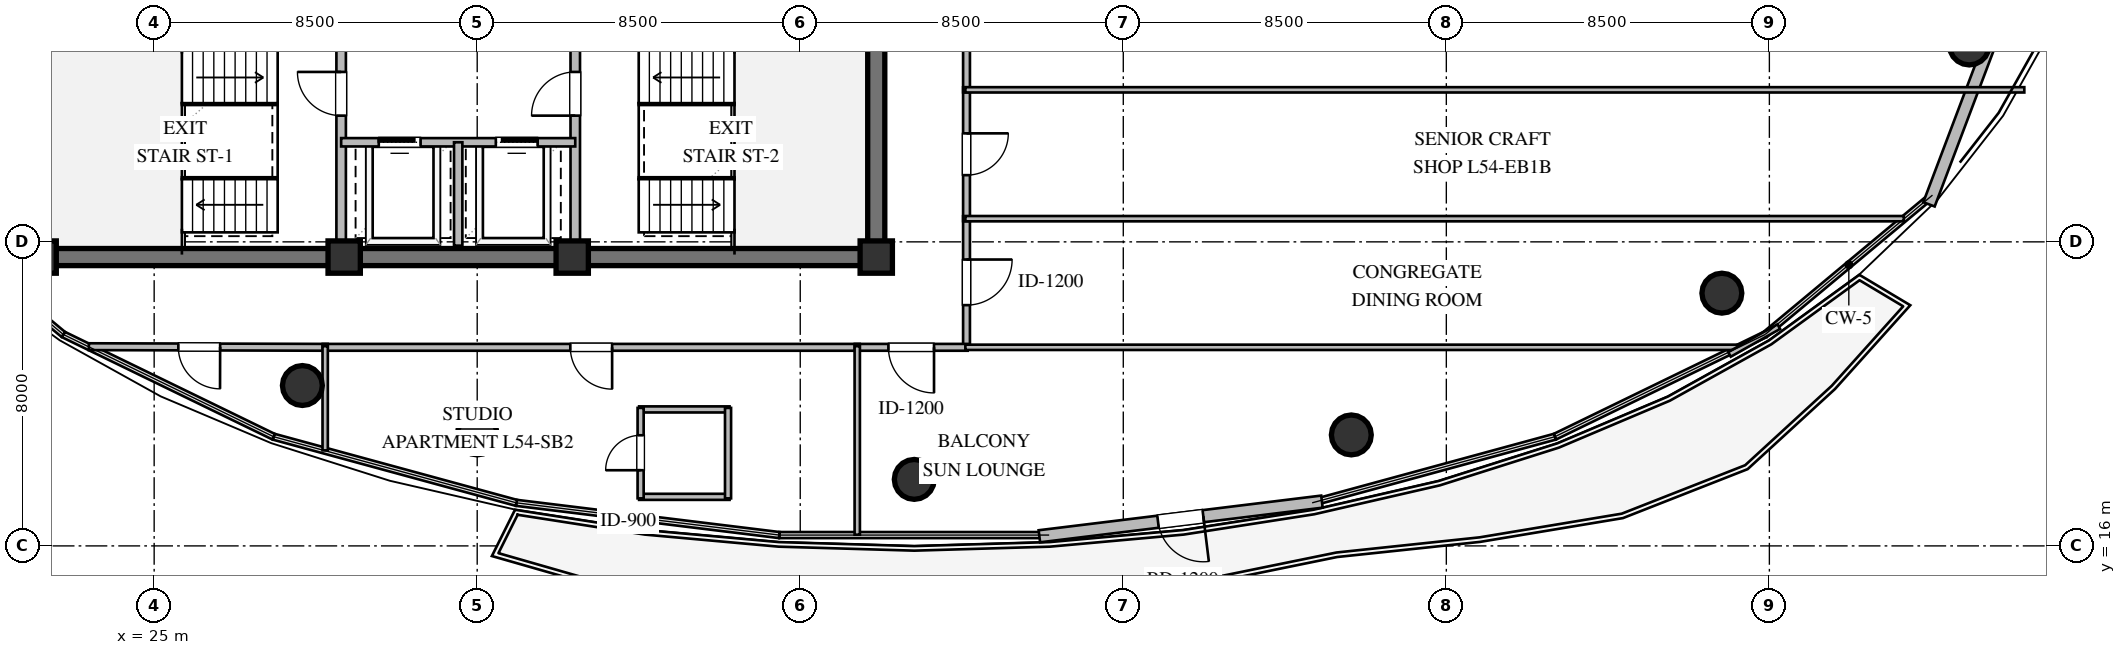
"""IFC4 building model, lengths in metres.
Left out: names, types, materials, properties, quantities, classifications, styles, units other than length and angle.
Written with IfcOpenShell. Run it as: python <this file> out.ifc"""

import sys

from ifc_helpers import new_model, si_unit, direction, frame, frame_2d, origin, origin_2d, place, context, subcontext, project, spatial, rectangle, circle, extrude, element, fill, save


model = new_model("IFC4")
c1 = context("Model", 3, precision=1e-05, world=origin(), true_north=direction((0.0, 1.0)))
c2 = subcontext(c1, "Body", "Model", "MODEL_VIEW")
j1 = project(units=[si_unit("LENGTHUNIT", "METRE"), si_unit("PLANEANGLEUNIT", "RADIAN")], contexts=[c1])
p1 = place(None, origin())
s1 = spatial("IfcSite", under=j1, at=p1, CompositionType="ELEMENT")
p2 = place(p1, origin())
s2 = spatial("IfcBuilding", under=s1, at=p2, CompositionType="ELEMENT")
p3 = place(p2, frame((0.0, 0.0, 206.4)))
s3 = spatial("IfcBuildingStorey", under=s2, at=p3, CompositionType="ELEMENT", Elevation=206.4)
p4 = place(p3, frame((21.775, 23.6, 0.0), z_axis=(0.0, 0.0, 1.0), x_axis=(1.0, 0.0, 0.0)))
e1 = element("IfcWall", 1, at=p4, inside=s3, PredefinedType="SHEAR", context=c2, shape_type="SweptSolid", body=[
    extrude(rectangle(XDim=22.45, YDim=0.45, at=frame_2d((11.225, 0.0))), origin(), (0.0, 0.0, 1.0), 3.36),
])
p5 = place(p3, frame((44.0, 23.825, 0.0), z_axis=(0.0, 0.0, 1.0), x_axis=(0.0, 1.0, 0.0)))
e2 = element("IfcWall", 2, at=p5, inside=s3, PredefinedType="SHEAR", context=c2, shape_type="SweptSolid", body=[
    extrude(rectangle(XDim=12.35, YDim=0.45, at=frame_2d((6.175, 0.0))), origin(), (0.0, 0.0, 1.0), 3.36),
])
p6 = place(p5, frame((8.675, 0.0, 0.0)))
e3 = element("IfcOpeningElement", 3, at=p6, cuts=e2, PredefinedType="OPENING", context=c2, shape_type="SweptSolid", body=[
    extrude(rectangle(XDim=1.5, YDim=2.15, at=frame_2d((0.75, 1.075))), frame((0.0, 0.235, 0.0), z_axis=(0.0, -1.0, 0.0), x_axis=(1.0, 0.0, 0.0)), (0.0, 0.0, 1.0), 0.47),
])
for number, where, z_axis, x_axis in (
    (4, (22.0, 23.6, 0.0), (0.0, 0.0, 1.0), (1.0, 0.0, 0.0)),
    (5, (30.0, 23.6, 0.0), (0.0, 0.0, 1.0), (1.0, 0.0, 0.0)),
    (6, (36.0, 23.6, 0.0), (0.0, 0.0, 1.0), (1.0, 0.0, 0.0)),
    (7, (44.0, 23.6, 0.0), (0.0, 0.0, 1.0), (1.0, 0.0, 0.0)),
):
    element("IfcColumn", number, at=place(p3, frame(where, z_axis=z_axis, x_axis=x_axis)), inside=s3, PredefinedType="COLUMN", context=c2, shape_type="SweptSolid", body=[
        extrude(rectangle(XDim=0.85, YDim=0.85, at=origin_2d()), origin(), (0.0, 0.0, 1.0), 3.6),
    ])
for number, where, z_axis, x_axis in (
    (8, (28.9, 20.22, 0.0), (0.0, 0.0, 1.0), (1.0, 0.0, 0.0)),
    (9, (33.5, 18.92, 0.0), (0.0, 0.0, 1.0), (1.0, 0.0, 0.0)),
    (10, (45.0, 17.75, 0.0), (0.0, 0.0, 1.0), (1.0, 0.0, 0.0)),
    (11, (56.5, 18.92, 0.0), (0.0, 0.0, 1.0), (1.0, 0.0, 0.0)),
    (12, (66.25, 22.65, 0.0), (0.0, 0.0, 1.0), (1.0, 0.0, 0.0)),
    (13, (72.76, 29.18, 0.0), (0.0, 0.0, 1.0), (1.0, 0.0, 0.0)),
):
    element("IfcColumn", number, at=place(p3, frame(where, z_axis=z_axis, x_axis=x_axis)), inside=s3, PredefinedType="COLUMN", context=c2, shape_type="SweptSolid", body=[
        extrude(circle(Radius=0.525, at=origin_2d()), origin(), (0.0, 0.0, 1.0), 3.6),
    ])
p7 = place(p3, frame((76.712, 38.243, 0.0), z_axis=(0.0, 0.0, 1.0), x_axis=(-0.353659523244, -0.935374225441, 0.0)))
e14 = element("IfcWall", 14, at=p7, inside=s3, PredefinedType="STANDARD", context=c2, shape_type="SweptSolid", body=[
    extrude(rectangle(XDim=14.172, YDim=0.32, at=frame_2d((7.086, 0.0))), origin(), (0.0, 0.0, 1.0), 3.36),
])
p8 = place(p3, frame((55.727, 17.165, 0.0), z_axis=(0.0, 0.0, 1.0), x_axis=(-0.992559081031, -0.121763995755, 0.0)))
e15 = element("IfcWall", 15, at=p8, inside=s3, PredefinedType="STANDARD", context=c2, shape_type="SweptSolid", body=[
    extrude(rectangle(XDim=7.491, YDim=0.32, at=frame_2d((3.745, 0.0))), origin(), (0.0, 0.0, 1.0), 3.36),
])
p9 = place(p8, frame((3.145, 0.0, 0.0)))
e16 = element("IfcOpeningElement", 16, at=p9, cuts=e15, PredefinedType="OPENING", context=c2, shape_type="SweptSolid", body=[
    extrude(rectangle(XDim=1.2, YDim=2.15, at=frame_2d((0.6, 1.075))), frame((0.0, 0.17, 0.0), z_axis=(0.0, -1.0, 0.0), x_axis=(1.0, 0.0, 0.0)), (0.0, 0.0, 1.0), 0.34),
])
p10 = place(p3, frame((29.92, 23.9, 0.0), z_axis=(0.0, 0.0, 1.0), x_axis=(0.0, 1.0, 0.0)))
e17 = element("IfcWall", 17, at=p10, inside=s3, PredefinedType="SOLIDWALL", context=c2, shape_type="SweptSolid", body=[
    extrude(rectangle(XDim=5.4, YDim=0.25, at=frame_2d((2.7, 0.0))), origin(), (0.0, 0.0, 1.0), 3.36),
])
p11 = place(p10, frame((3.421, 0.0, 0.0)))
e18 = element("IfcOpeningElement", 18, at=p11, cuts=e17, PredefinedType="OPENING", context=c2, shape_type="SweptSolid", body=[
    extrude(rectangle(XDim=1.15, YDim=2.1, at=frame_2d((0.575, 1.05))), frame((0.0, 0.135, 0.0), z_axis=(0.0, -1.0, 0.0), x_axis=(1.0, 0.0, 0.0)), (0.0, 0.0, 1.0), 0.27),
])
p12 = place(p3, frame((36.08, 23.9, 0.0), z_axis=(0.0, 0.0, 1.0), x_axis=(0.0, 1.0, 0.0)))
e19 = element("IfcWall", 19, at=p12, inside=s3, PredefinedType="SOLIDWALL", context=c2, shape_type="SweptSolid", body=[
    extrude(rectangle(XDim=5.4, YDim=0.25, at=frame_2d((2.7, 0.0))), origin(), (0.0, 0.0, 1.0), 3.36),
])
p13 = place(p12, frame((3.421, 0.0, 0.0)))
e20 = element("IfcOpeningElement", 20, at=p13, cuts=e19, PredefinedType="OPENING", context=c2, shape_type="SweptSolid", body=[
    extrude(rectangle(XDim=1.15, YDim=2.1, at=frame_2d((0.575, 1.05))), frame((0.0, 0.135, 0.0), z_axis=(0.0, -1.0, 0.0), x_axis=(1.0, 0.0, 0.0)), (0.0, 0.0, 1.0), 0.27),
])
p14 = place(p3, frame((29.92, 26.62, 0.0), z_axis=(0.0, 0.0, 1.0), x_axis=(1.0, 0.0, 0.0)))
e21 = element("IfcWall", 21, at=p14, inside=s3, PredefinedType="SOLIDWALL", context=c2, shape_type="SweptSolid", body=[
    extrude(rectangle(XDim=6.16, YDim=0.22, at=frame_2d((3.08, 0.0))), origin(), (0.0, 0.0, 1.0), 3.36),
])
p15 = place(p14, frame((0.99, 0.0, 0.0)))
e22 = element("IfcOpeningElement", 22, at=p15, cuts=e21, PredefinedType="OPENING", context=c2, shape_type="SweptSolid", body=[
    extrude(rectangle(XDim=1.1, YDim=2.1, at=frame_2d((0.55, 1.05))), frame((0.0, 0.12, 0.0), z_axis=(0.0, -1.0, 0.0), x_axis=(1.0, 0.0, 0.0)), (0.0, 0.0, 1.0), 0.24),
])
p16 = place(p14, frame((4.07, 0.0, 0.0)))
e23 = element("IfcOpeningElement", 23, at=p16, cuts=e21, PredefinedType="OPENING", context=c2, shape_type="SweptSolid", body=[
    extrude(rectangle(XDim=1.1, YDim=2.1, at=frame_2d((0.55, 1.05))), frame((0.0, 0.12, 0.0), z_axis=(0.0, -1.0, 0.0), x_axis=(1.0, 0.0, 0.0)), (0.0, 0.0, 1.0), 0.24),
])
p17 = place(p3, frame((33.0, 23.9, 0.0), z_axis=(0.0, 0.0, 1.0), x_axis=(0.0, 1.0, 0.0)))
e24 = element("IfcWall", 24, at=p17, inside=s3, PredefinedType="SOLIDWALL", context=c2, shape_type="SweptSolid", body=[
    extrude(rectangle(XDim=2.72, YDim=0.22, at=frame_2d((1.36, 0.0))), origin(), (0.0, 0.0, 1.0), 3.36),
])
for number, where, z_axis, x_axis in (
    (25, (37.76, 17.291, 0.0), (0.0, 0.0, 1.0), (1.0, 0.0, 0.0)),
    (26, (37.76, 19.591, 0.0), (0.0, 0.0, 1.0), (1.0, 0.0, 0.0)),
):
    element("IfcWall", number, at=place(p3, frame(where, z_axis=z_axis, x_axis=x_axis)), inside=s3, PredefinedType="PLUMBINGWALL", context=c2, shape_type="SweptSolid", body=[
        extrude(rectangle(XDim=2.38, YDim=0.16, at=frame_2d((1.19, 0.0))), origin(), (0.0, 0.0, 1.0), 3.36),
    ])
p18 = place(p3, frame((37.8, 17.251, 0.0), z_axis=(0.0, 0.0, 1.0), x_axis=(0.0, 1.0, 0.0)))
e27 = element("IfcWall", 27, at=p18, inside=s3, PredefinedType="PLUMBINGWALL", context=c2, shape_type="SweptSolid", body=[
    extrude(rectangle(XDim=2.38, YDim=0.16, at=frame_2d((1.19, 0.0))), origin(), (0.0, 0.0, 1.0), 3.36),
])
p19 = place(p18, frame((0.74, 0.0, 0.0)))
e28 = element("IfcOpeningElement", 28, at=p19, cuts=e27, PredefinedType="OPENING", context=c2, shape_type="SweptSolid", body=[
    extrude(rectangle(XDim=0.92, YDim=2.1, at=frame_2d((0.46, 1.05))), frame((0.0, 0.09, 0.0), z_axis=(0.0, -1.0, 0.0), x_axis=(1.0, 0.0, 0.0)), (0.0, 0.0, 1.0), 0.18),
])
p20 = place(p3, frame((40.1, 17.251, 0.0), z_axis=(0.0, 0.0, 1.0), x_axis=(0.0, 1.0, 0.0)))
e29 = element("IfcWall", 29, at=p20, inside=s3, PredefinedType="PLUMBINGWALL", context=c2, shape_type="SweptSolid", body=[
    extrude(rectangle(XDim=2.38, YDim=0.16, at=frame_2d((1.19, 0.0))), origin(), (0.0, 0.0, 1.0), 3.36),
])
p21 = place(p3, frame((46.375, 24.675, 0.0), z_axis=(0.0, 0.0, 1.0), x_axis=(0.0, -1.0, 0.0)))
e30 = element("IfcWall", 30, at=p21, inside=s3, PredefinedType="PARTITIONING", context=c2, shape_type="SweptSolid", body=[
    extrude(rectangle(XDim=3.48, YDim=0.18, at=frame_2d((1.74, 0.0))), origin(), (0.0, 0.0, 1.0), 3.36),
])
p22 = place(p21, frame((1.14, 0.0, 0.0)))
e31 = element("IfcOpeningElement", 31, at=p22, cuts=e30, PredefinedType="OPENING", context=c2, shape_type="SweptSolid", body=[
    extrude(rectangle(XDim=1.2, YDim=2.15, at=frame_2d((0.6, 1.075))), frame((0.0, 0.1, 0.0), z_axis=(0.0, -1.0, 0.0), x_axis=(1.0, 0.0, 0.0)), (0.0, 0.0, 1.0), 0.2),
])
p23 = place(p3, frame((46.375, 28.065, 0.0), z_axis=(0.0, 0.0, 1.0), x_axis=(0.0, -1.0, 0.0)))
e32 = element("IfcWall", 32, at=p23, inside=s3, PredefinedType="PARTITIONING", context=c2, shape_type="SweptSolid", body=[
    extrude(rectangle(XDim=3.52, YDim=0.18, at=frame_2d((1.76, 0.0))), origin(), (0.0, 0.0, 1.0), 3.36),
])
p24 = place(p23, frame((1.21, 0.0, 0.0)))
e33 = element("IfcOpeningElement", 33, at=p24, cuts=e32, PredefinedType="OPENING", context=c2, shape_type="SweptSolid", body=[
    extrude(rectangle(XDim=1.1, YDim=2.1, at=frame_2d((0.55, 1.05))), frame((0.0, 0.1, 0.0), z_axis=(0.0, -1.0, 0.0), x_axis=(1.0, 0.0, 0.0)), (0.0, 0.0, 1.0), 0.2),
])
p25 = place(p3, frame((46.375, 31.565, 0.0), z_axis=(0.0, 0.0, 1.0), x_axis=(0.0, -1.0, 0.0)))
e34 = element("IfcWall", 34, at=p25, inside=s3, PredefinedType="PARTITIONING", context=c2, shape_type="SweptSolid", body=[
    extrude(rectangle(XDim=3.63, YDim=0.18, at=frame_2d((1.815, 0.0))), origin(), (0.0, 0.0, 1.0), 3.36),
])
p26 = place(p25, frame((1.265, 0.0, 0.0)))
e35 = element("IfcOpeningElement", 35, at=p26, cuts=e34, PredefinedType="OPENING", context=c2, shape_type="SweptSolid", body=[
    extrude(rectangle(XDim=1.1, YDim=2.1, at=frame_2d((0.55, 1.05))), frame((0.0, 0.1, 0.0), z_axis=(0.0, -1.0, 0.0), x_axis=(1.0, 0.0, 0.0)), (0.0, 0.0, 1.0), 0.2),
])
p27 = place(p3, frame((29.565, 21.225, 0.0), z_axis=(0.0, 0.0, 1.0), x_axis=(-0.999996509373, 0.002642204019, 0.0)))
e36 = element("IfcWall", 36, at=p27, inside=s3, PredefinedType="PARTITIONING", context=c2, shape_type="SweptSolid", body=[
    extrude(rectangle(XDim=6.283, YDim=0.18, at=frame_2d((3.142, 0.0))), origin(), (0.0, 0.0, 1.0), 2.806),
])
p28 = place(p27, frame((2.829, 0.0, 0.0)))
e37 = element("IfcOpeningElement", 37, at=p28, cuts=e36, PredefinedType="OPENING", context=c2, shape_type="SweptSolid", body=[
    extrude(rectangle(XDim=1.1, YDim=2.1, at=frame_2d((0.55, 1.05))), frame((0.0, 0.1, 0.0), z_axis=(0.0, -1.0, 0.0), x_axis=(1.0, 0.0, 0.0)), (0.0, 0.0, 1.0), 0.2),
])
p29 = place(p3, frame((43.565, 21.225, 0.0), z_axis=(0.0, 0.0, 1.0), x_axis=(-1.0, 0.0, 0.0)))
e38 = element("IfcWall", 38, at=p29, inside=s3, PredefinedType="PARTITIONING", context=c2, shape_type="SweptSolid", body=[
    extrude(rectangle(XDim=14.13, YDim=0.18, at=frame_2d((7.065, 0.0))), origin(), (0.0, 0.0, 1.0), 2.996),
])
p30 = place(p29, frame((6.515, 0.0, 0.0)))
e39 = element("IfcOpeningElement", 39, at=p30, cuts=e38, PredefinedType="OPENING", context=c2, shape_type="SweptSolid", body=[
    extrude(rectangle(XDim=1.1, YDim=2.1, at=frame_2d((0.55, 1.05))), frame((0.0, 0.1, 0.0), z_axis=(0.0, -1.0, 0.0), x_axis=(1.0, 0.0, 0.0)), (0.0, 0.0, 1.0), 0.2),
])
p31 = place(p3, frame((46.405, 21.225, 0.0), z_axis=(0.0, 0.0, 1.0), x_axis=(-1.0, 0.0, 0.0)))
e40 = element("IfcWall", 40, at=p31, inside=s3, PredefinedType="PARTITIONING", context=c2, shape_type="SweptSolid", body=[
    extrude(rectangle(XDim=2.97, YDim=0.18, at=frame_2d((1.485, 0.0))), origin(), (0.0, 0.0, 1.0), 3.36),
])
p32 = place(p31, frame((0.885, 0.0, 0.0)))
e41 = element("IfcOpeningElement", 41, at=p32, cuts=e40, PredefinedType="OPENING", context=c2, shape_type="SweptSolid", body=[
    extrude(rectangle(XDim=1.2, YDim=2.15, at=frame_2d((0.6, 1.075))), frame((0.0, 0.1, 0.0), z_axis=(0.0, -1.0, 0.0), x_axis=(1.0, 0.0, 0.0)), (0.0, 0.0, 1.0), 0.2),
])
p33 = place(p3, frame((46.345, 24.61, 0.0), z_axis=(0.0, 0.0, 1.0), x_axis=(1.0, 0.0, 0.0)))
e42 = element("IfcWall", 42, at=p33, inside=s3, PredefinedType="PARTITIONING", context=c2, shape_type="SweptSolid", body=[
    extrude(rectangle(XDim=24.693, YDim=0.14, at=frame_2d((12.346, 0.0))), origin(), (0.0, 0.0, 1.0), 2.806),
])
p34 = place(p3, frame((66.684, 21.225, 0.0), z_axis=(0.0, 0.0, 1.0), x_axis=(-1.0, 0.0, 0.0)))
e43 = element("IfcWall", 43, at=p34, inside=s3, PredefinedType="PARTITIONING", context=c2, shape_type="SweptSolid", body=[
    extrude(rectangle(XDim=20.339, YDim=0.14, at=frame_2d((10.169, 0.0))), origin(), (0.0, 0.0, 1.0), 2.996),
])
p35 = place(p3, frame((67.748, 21.77, 0.0), z_axis=(0.0, 0.0, 1.0), x_axis=(-0.871352238731, -0.490658003153, 0.0)))
e44 = element("IfcWall", 44, at=p35, inside=s3, PredefinedType="PARTITIONING", context=c2, shape_type="SweptSolid", body=[
    extrude(rectangle(XDim=1.49, YDim=0.14, at=frame_2d((0.745, 0.0))), origin(), (0.0, 0.0, 1.0), 3.36),
])
p36 = place(p3, frame((46.345, 28.0, 0.0), z_axis=(0.0, 0.0, 1.0), x_axis=(1.0, 0.0, 0.0)))
e45 = element("IfcWall", 45, at=p36, inside=s3, PredefinedType="PARTITIONING", context=c2, shape_type="SweptSolid", body=[
    extrude(rectangle(XDim=27.863, YDim=0.14, at=frame_2d((13.932, 0.0))), origin(), (0.0, 0.0, 1.0), 2.806),
])
p37 = place(p3, frame((29.5, 21.255, 0.0), z_axis=(0.0, 0.0, 1.0), x_axis=(0.0, -1.0, 0.0)))
e46 = element("IfcWall", 46, at=p37, inside=s3, PredefinedType="PARTITIONING", context=c2, shape_type="SweptSolid", body=[
    extrude(rectangle(XDim=2.741, YDim=0.14, at=frame_2d((1.371, 0.0))), origin(), (0.0, 0.0, 1.0), 3.36),
])
p38 = place(p3, frame((43.5, 21.255, 0.0), z_axis=(0.0, 0.0, 1.0), x_axis=(0.0, -1.0, 0.0)))
e47 = element("IfcWall", 47, at=p38, inside=s3, PredefinedType="PARTITIONING", context=c2, shape_type="SweptSolid", body=[
    extrude(rectangle(XDim=4.96, YDim=0.14, at=frame_2d((2.48, 0.0))), origin(), (0.0, 0.0, 1.0), 3.36),
])
p39 = place(p9, origin())
e48 = element("IfcDoor", 48, at=p39, inside=s3, OperationType="SINGLE_SWING_LEFT", PredefinedType="DOOR", context=c2, shape_type="SweptSolid", body=[
    extrude(rectangle(XDim=1.2, YDim=2.15, at=frame_2d((0.6, 1.075))), frame((0.0, 0.025, 0.0), z_axis=(0.0, -1.0, 0.0), x_axis=(1.0, 0.0, 0.0)), (0.0, 0.0, 1.0), 0.05),
])
fill(e16, e48)
p40 = place(p11, origin())
e49 = element("IfcDoor", 49, at=p40, inside=s3, OperationType="SINGLE_SWING_RIGHT", PredefinedType="DOOR", context=c2, shape_type="SweptSolid", body=[
    extrude(rectangle(XDim=1.15, YDim=2.1, at=frame_2d((0.575, 1.05))), frame((0.0, 0.025, 0.0), z_axis=(0.0, -1.0, 0.0), x_axis=(1.0, 0.0, 0.0)), (0.0, 0.0, 1.0), 0.05),
])
fill(e18, e49)
p41 = place(p13, origin())
e50 = element("IfcDoor", 50, at=p41, inside=s3, OperationType="SINGLE_SWING_LEFT", PredefinedType="DOOR", context=c2, shape_type="SweptSolid", body=[
    extrude(rectangle(XDim=1.15, YDim=2.1, at=frame_2d((0.575, 1.05))), frame((0.0, 0.025, 0.0), z_axis=(0.0, -1.0, 0.0), x_axis=(1.0, 0.0, 0.0)), (0.0, 0.0, 1.0), 0.05),
])
fill(e20, e50)
p42 = place(p15, origin())
e51 = element("IfcDoor", 51, at=p42, inside=s3, OperationType="SLIDING_TO_LEFT", PredefinedType="DOOR", context=c2, shape_type="SweptSolid", body=[
    extrude(rectangle(XDim=1.1, YDim=2.1, at=frame_2d((0.55, 1.05))), frame((0.0, 0.025, 0.0), z_axis=(0.0, -1.0, 0.0), x_axis=(1.0, 0.0, 0.0)), (0.0, 0.0, 1.0), 0.05),
])
fill(e22, e51)
p43 = place(p16, origin())
e52 = element("IfcDoor", 52, at=p43, inside=s3, OperationType="SLIDING_TO_RIGHT", PredefinedType="DOOR", context=c2, shape_type="SweptSolid", body=[
    extrude(rectangle(XDim=1.1, YDim=2.1, at=frame_2d((0.55, 1.05))), frame((0.0, 0.025, 0.0), z_axis=(0.0, -1.0, 0.0), x_axis=(1.0, 0.0, 0.0)), (0.0, 0.0, 1.0), 0.05),
])
fill(e23, e52)
p44 = place(p19, origin())
e53 = element("IfcDoor", 53, at=p44, inside=s3, OperationType="SINGLE_SWING_LEFT", PredefinedType="DOOR", context=c2, shape_type="SweptSolid", body=[
    extrude(rectangle(XDim=0.92, YDim=2.1, at=frame_2d((0.46, 1.05))), frame((0.0, 0.025, 0.0), z_axis=(0.0, -1.0, 0.0), x_axis=(1.0, 0.0, 0.0)), (0.0, 0.0, 1.0), 0.05),
])
fill(e28, e53)
p45 = place(p22, origin())
e54 = element("IfcDoor", 54, at=p45, inside=s3, OperationType="SINGLE_SWING_LEFT", PredefinedType="DOOR", context=c2, shape_type="SweptSolid", body=[
    extrude(rectangle(XDim=1.2, YDim=2.15, at=frame_2d((0.6, 1.075))), frame((0.0, 0.025, 0.0), z_axis=(0.0, -1.0, 0.0), x_axis=(1.0, 0.0, 0.0)), (0.0, 0.0, 1.0), 0.05),
])
fill(e31, e54)
p46 = place(p24, origin())
e55 = element("IfcDoor", 55, at=p46, inside=s3, OperationType="SINGLE_SWING_LEFT", PredefinedType="DOOR", context=c2, shape_type="SweptSolid", body=[
    extrude(rectangle(XDim=1.1, YDim=2.1, at=frame_2d((0.55, 1.05))), frame((0.0, 0.025, 0.0), z_axis=(0.0, -1.0, 0.0), x_axis=(1.0, 0.0, 0.0)), (0.0, 0.0, 1.0), 0.05),
])
fill(e33, e55)
p47 = place(p28, origin())
e56 = element("IfcDoor", 56, at=p47, inside=s3, OperationType="SINGLE_SWING_LEFT", PredefinedType="DOOR", context=c2, shape_type="SweptSolid", body=[
    extrude(rectangle(XDim=1.1, YDim=2.1, at=frame_2d((0.55, 1.05))), frame((0.0, 0.025, 0.0), z_axis=(0.0, -1.0, 0.0), x_axis=(1.0, 0.0, 0.0)), (0.0, 0.0, 1.0), 0.05),
])
fill(e37, e56)
p48 = place(p30, origin())
e57 = element("IfcDoor", 57, at=p48, inside=s3, OperationType="SINGLE_SWING_LEFT", PredefinedType="DOOR", context=c2, shape_type="SweptSolid", body=[
    extrude(rectangle(XDim=1.1, YDim=2.1, at=frame_2d((0.55, 1.05))), frame((0.0, 0.025, 0.0), z_axis=(0.0, -1.0, 0.0), x_axis=(1.0, 0.0, 0.0)), (0.0, 0.0, 1.0), 0.05),
])
fill(e39, e57)
p49 = place(p32, origin())
e58 = element("IfcDoor", 58, at=p49, inside=s3, OperationType="SINGLE_SWING_LEFT", PredefinedType="DOOR", context=c2, shape_type="SweptSolid", body=[
    extrude(rectangle(XDim=1.2, YDim=2.15, at=frame_2d((0.6, 1.075))), frame((0.0, 0.025, 0.0), z_axis=(0.0, -1.0, 0.0), x_axis=(1.0, 0.0, 0.0)), (0.0, 0.0, 1.0), 0.05),
])
fill(e41, e58)
save(model, sys.argv[1])
